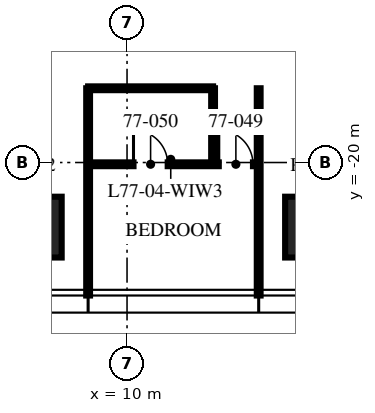
"""IFC4 building model, lengths in metres.
Left out: names, types, materials, properties, quantities, classifications, styles, units other than length and angle.
Written with IfcOpenShell. Run it as: python <this file> out.ifc"""

import sys

from ifc_helpers import new_model, si_unit, direction, frame, frame_2d, origin, origin_2d, place, context, subcontext, project, spatial, rectangle, extrude, element, fill, save


model = new_model("IFC4")
c1 = context("Model", 3, precision=1e-05, world=origin(), true_north=direction((0.0, 1.0)))
c2 = subcontext(c1, "Body", "Model", "MODEL_VIEW")
j1 = project(units=[si_unit("LENGTHUNIT", "METRE"), si_unit("PLANEANGLEUNIT", "RADIAN")], contexts=[c1])
p1 = place(None, origin())
s1 = spatial("IfcSite", under=j1, at=p1, CompositionType="ELEMENT")
p2 = place(p1, origin())
s2 = spatial("IfcBuilding", under=s1, at=p2, CompositionType="ELEMENT")
p3 = place(p2, frame((0.0, 0.0, 308.25)))
s3 = spatial("IfcBuildingStorey", under=s2, at=p3, CompositionType="ELEMENT", Elevation=308.25)
for number, where, z_axis, x_axis in (
    (1, (14.96, -21.7, 0.0), (0.0, 0.0, 1.0), (1.0, 0.0, 0.0)),
    (2, (7.48, -21.7, 0.0), (0.0, 0.0, 1.0), (1.0, 0.0, 0.0)),
):
    element("IfcColumn", number, at=place(p3, frame(where, z_axis=z_axis, x_axis=x_axis)), inside=s3, PredefinedType="COLUMN", context=c2, shape_type="SweptSolid", body=[
        extrude(rectangle(XDim=1.6, YDim=1.6, at=origin_2d()), origin(), (0.0, 0.0, 1.0), 3.75),
    ])
for number, where, z_axis, x_axis in (
    (3, (8.976, -18.046, 0.0), (0.0, 0.0, 1.0), (0.0, -1.0, 0.0)),
    (4, (13.464, -18.046, 0.0), (0.0, 0.0, 1.0), (0.0, -1.0, 0.0)),
):
    element("IfcWall", number, at=place(p3, frame(where, z_axis=z_axis, x_axis=x_axis)), inside=s3, PredefinedType="PARTITIONING", context=c2, shape_type="SweptSolid", body=[
        extrude(rectangle(XDim=5.454, YDim=0.1, at=frame_2d((2.727, 0.0))), origin(), (0.0, 0.0, 1.0), 3.01),
    ])
p4 = place(p3, frame((8.976, -20.046, 0.0), z_axis=(0.0, 0.0, 1.0), x_axis=(1.0, 0.0, 0.0)))
e5 = element("IfcWall", 5, at=p4, inside=s3, PredefinedType="PARTITIONING", context=c2, shape_type="SweptSolid", body=[
    extrude(rectangle(XDim=4.488, YDim=0.1, at=frame_2d((2.244, 0.0))), origin(), (0.0, 0.0, 1.0), 2.91),
])
p5 = place(p4, frame((3.438, 0.0, 0.0)))
e6 = element("IfcOpeningElement", 6, at=p5, cuts=e5, PredefinedType="OPENING", context=c2, shape_type="SweptSolid", body=[
    extrude(rectangle(XDim=0.9, YDim=2.1, at=frame_2d((0.45, 1.05))), frame((0.0, 0.06, 0.0), z_axis=(0.0, -1.0, 0.0), x_axis=(1.0, 0.0, 0.0)), (0.0, 0.0, 1.0), 0.12),
])
p6 = place(p4, frame((1.194, 0.0, 0.0)))
e7 = element("IfcOpeningElement", 7, at=p6, cuts=e5, PredefinedType="OPENING", context=c2, shape_type="SweptSolid", body=[
    extrude(rectangle(XDim=0.9, YDim=2.1, at=frame_2d((0.45, 1.05))), frame((0.0, 0.06, 0.0), z_axis=(0.0, -1.0, 0.0), x_axis=(1.0, 0.0, 0.0)), (0.0, 0.0, 1.0), 0.12),
])
p7 = place(p3, frame((12.264, -18.046, 0.0), z_axis=(0.0, 0.0, 1.0), x_axis=(0.0, -1.0, 0.0)))
e8 = element("IfcWall", 8, at=p7, inside=s3, PredefinedType="PARTITIONING", context=c2, shape_type="SweptSolid", body=[
    extrude(rectangle(XDim=2.0, YDim=0.1, at=frame_2d((1.0, 0.0))), origin(), (0.0, 0.0, 1.0), 3.5),
])
p8 = place(p3, frame((8.976, -18.046, 0.0), z_axis=(0.0, 0.0, 1.0), x_axis=(1.0, 0.0, 0.0)))
e9 = element("IfcWall", 9, at=p8, inside=s3, PredefinedType="PARTITIONING", context=c2, shape_type="SweptSolid", body=[
    extrude(rectangle(XDim=3.288, YDim=0.1, at=frame_2d((1.644, 0.0))), origin(), (0.0, 0.0, 1.0), 2.91),
])
p9 = place(p5, origin())
e10 = element("IfcDoor", 10, at=p9, inside=s3, OperationType="SINGLE_SWING_LEFT", PredefinedType="DOOR", context=c2, shape_type="SweptSolid", body=[
    extrude(rectangle(XDim=0.9, YDim=2.1, at=frame_2d((0.45, 1.05))), frame((0.0, 0.025, 0.0), z_axis=(0.0, -1.0, 0.0), x_axis=(1.0, 0.0, 0.0)), (0.0, 0.0, 1.0), 0.05),
])
fill(e6, e10)
p10 = place(p6, origin())
e11 = element("IfcDoor", 11, at=p10, inside=s3, OperationType="SINGLE_SWING_LEFT", PredefinedType="DOOR", context=c2, shape_type="SweptSolid", body=[
    extrude(rectangle(XDim=0.9, YDim=2.1, at=frame_2d((0.45, 1.05))), frame((0.0, 0.025, 0.0), z_axis=(0.0, -1.0, 0.0), x_axis=(1.0, 0.0, 0.0)), (0.0, 0.0, 1.0), 0.05),
])
fill(e7, e11)
save(model, sys.argv[1])
